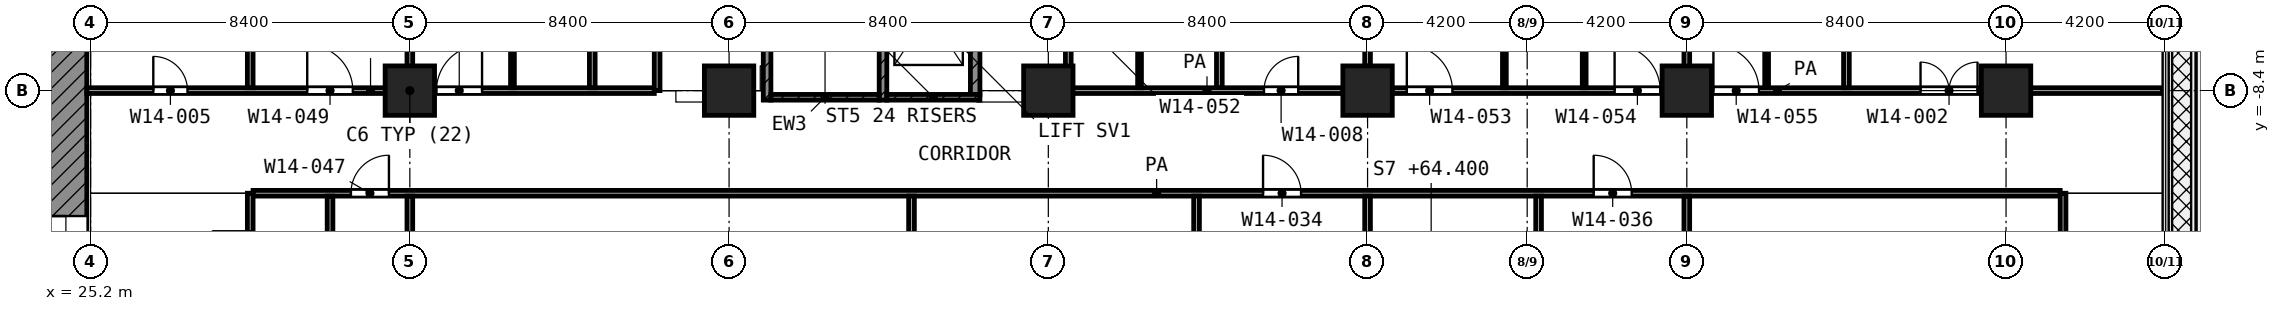
"""IFC4 building model, lengths in metres.
Left out: names, types, materials, properties, quantities, classifications, styles, units other than length and angle.
Written with IfcOpenShell. Run it as: python <this file> out.ifc"""

import sys

from ifc_helpers import new_model, si_unit, direction, frame, frame_2d, origin, origin_2d, place, context, subcontext, project, spatial, rectangle, extrude, element, fill, save


model = new_model("IFC4")
c1 = context("Model", 3, precision=1e-05, world=origin(), true_north=direction((0.0, 1.0)))
c2 = subcontext(c1, "Body", "Model", "MODEL_VIEW")
j1 = project(units=[si_unit("LENGTHUNIT", "METRE"), si_unit("PLANEANGLEUNIT", "RADIAN")], contexts=[c1])
p1 = place(None, origin())
s1 = spatial("IfcSite", under=j1, at=p1, CompositionType="ELEMENT")
p2 = place(p1, origin())
s2 = spatial("IfcBuilding", under=s1, at=p2, CompositionType="ELEMENT")
p3 = place(p2, frame((0.0, 0.0, 64.4)))
s3 = spatial("IfcBuildingStorey", under=s2, at=p3, CompositionType="ELEMENT", Elevation=64.4)
for number, where, z_axis, x_axis in (
    (1, (33.6, -8.4, 0.0), (0.0, 0.0, 1.0), (1.0, 0.0, 0.0)),
    (2, (42.0, -8.4, 0.0), (0.0, 0.0, 1.0), (1.0, 0.0, 0.0)),
    (3, (50.4, -8.4, 0.0), (0.0, 0.0, 1.0), (1.0, 0.0, 0.0)),
    (4, (58.8, -8.4, 0.0), (0.0, 0.0, 1.0), (1.0, 0.0, 0.0)),
    (5, (67.2, -8.4, 0.0), (0.0, 0.0, 1.0), (1.0, 0.0, 0.0)),
    (6, (75.6, -8.4, 0.0), (0.0, 0.0, 1.0), (1.0, 0.0, 0.0)),
):
    element("IfcColumn", number, at=place(p3, frame(where, z_axis=z_axis, x_axis=x_axis)), inside=s3, PredefinedType="COLUMN", context=c2, shape_type="SweptSolid", body=[
        extrude(rectangle(XDim=1.3, YDim=1.3, at=origin_2d()), origin(), (0.0, 0.0, 1.0), 4.2),
    ])
p4 = place(p3, frame((24.55, -24.0, 0.0), z_axis=(0.0, 0.0, 1.0), x_axis=(0.0, 1.0, 0.0)))
e7 = element("IfcWall", 7, at=p4, inside=s3, PredefinedType="SHEAR", context=c2, shape_type="SweptSolid", body=[
    extrude(rectangle(XDim=18.6, YDim=1.1, at=frame_2d((9.3, 0.0))), origin(), (0.0, 0.0, 1.0), 3.9),
])
p5 = place(p4, frame((10.5, 0.0, 0.0)))
e8 = element("IfcOpeningElement", 8, at=p5, cuts=e7, PredefinedType="OPENING", context=c2, shape_type="SweptSolid", body=[
    extrude(rectangle(XDim=1.8, YDim=2.1, at=frame_2d((0.9, 1.05))), frame((0.0, 0.56, 0.0), z_axis=(0.0, -1.0, 0.0), x_axis=(1.0, 0.0, 0.0)), (0.0, 0.0, 1.0), 1.12),
])
p6 = place(p3, frame((43.0, -8.65, 0.0), z_axis=(0.0, 0.0, 1.0), x_axis=(0.0, 1.0, 0.0)))
e9 = element("IfcWall", 9, at=p6, inside=s3, PredefinedType="SHEAR", context=c2, shape_type="SweptSolid", body=[
    extrude(rectangle(XDim=8.35, YDim=0.2, at=frame_2d((4.175, 0.0))), origin(), (0.0, 0.0, 1.0), 3.9),
])
p7 = place(p6, frame((7.0, 0.0, 0.0)))
e10 = element("IfcOpeningElement", 10, at=p7, cuts=e9, PredefinedType="OPENING", context=c2, shape_type="SweptSolid", body=[
    extrude(rectangle(XDim=1.1, YDim=2.1, at=frame_2d((0.55, 1.05))), frame((0.0, 0.11, 0.0), z_axis=(0.0, -1.0, 0.0), x_axis=(1.0, 0.0, 0.0)), (0.0, 0.0, 1.0), 0.22),
])
p8 = place(p3, frame((46.05, -8.65, 0.0), z_axis=(0.0, 0.0, 1.0), x_axis=(0.0, 1.0, 0.0)))
e11 = element("IfcWall", 11, at=p8, inside=s3, PredefinedType="SHEAR", context=c2, shape_type="SweptSolid", body=[
    extrude(rectangle(XDim=8.35, YDim=0.2, at=frame_2d((4.175, 0.0))), origin(), (0.0, 0.0, 1.0), 3.9),
])
p9 = place(p8, frame((7.0, 0.0, 0.0)))
e12 = element("IfcOpeningElement", 12, at=p9, cuts=e11, PredefinedType="OPENING", context=c2, shape_type="SweptSolid", body=[
    extrude(rectangle(XDim=1.1, YDim=2.1, at=frame_2d((0.55, 1.05))), frame((0.0, 0.11, 0.0), z_axis=(0.0, -1.0, 0.0), x_axis=(1.0, 0.0, 0.0)), (0.0, 0.0, 1.0), 0.22),
])
p10 = place(p3, frame((43.1, -8.575, 0.0), z_axis=(0.0, 0.0, 1.0), x_axis=(1.0, 0.0, 0.0)))
e13 = element("IfcWall", 13, at=p10, inside=s3, PredefinedType="SHEAR", context=c2, shape_type="SweptSolid", body=[
    extrude(rectangle(XDim=2.85, YDim=0.15, at=frame_2d((1.425, 0.0))), origin(), (0.0, 0.0, 1.0), 3.9),
])
p11 = place(p3, frame((46.15, -8.575, 0.0), z_axis=(0.0, 0.0, 1.0), x_axis=(1.0, 0.0, 0.0)))
e14 = element("IfcWall", 14, at=p11, inside=s3, PredefinedType="SHEAR", context=c2, shape_type="SweptSolid", body=[
    extrude(rectangle(XDim=2.45, YDim=0.15, at=frame_2d((1.225, 0.0))), origin(), (0.0, 0.0, 1.0), 3.9),
])
p12 = place(p3, frame((48.475, -8.5, 0.0), z_axis=(0.0, 0.0, 1.0), x_axis=(0.0, 1.0, 0.0)))
e15 = element("IfcWall", 15, at=p12, inside=s3, PredefinedType="SHEAR", context=c2, shape_type="SweptSolid", body=[
    extrude(rectangle(XDim=3.475, YDim=0.25, at=frame_2d((1.738, 0.0))), origin(), (0.0, 0.0, 1.0), 3.9),
])
for number, where, z_axis, x_axis in (
    (16, (36.3, -8.325, 0.0), (0.0, 0.0, 1.0), (0.0, 1.0, 0.0)),
    (17, (52.8, -8.325, 0.0), (0.0, 0.0, 1.0), (0.0, 1.0, 0.0)),
):
    element("IfcWall", number, at=place(p3, frame(where, z_axis=z_axis, x_axis=x_axis)), inside=s3, PredefinedType="PARTITIONING", context=c2, shape_type="SweptSolid", body=[
        extrude(rectangle(XDim=3.225, YDim=0.1, at=frame_2d((1.612, 0.0))), origin(), (0.0, 0.0, 1.0), 3.9),
    ])
p13 = place(p3, frame((62.4, -8.325, 0.0), z_axis=(0.0, 0.0, 1.0), x_axis=(0.0, 1.0, 0.0)))
e18 = element("IfcWall", 18, at=p13, inside=s3, PredefinedType="PARTITIONING", context=c2, shape_type="SweptSolid", body=[
    extrude(rectangle(XDim=3.224, YDim=0.1, at=frame_2d((1.612, 0.0))), origin(), (0.0, 0.0, 1.0), 3.9),
])
p14 = place(p3, frame((64.5, -8.325, 0.0), z_axis=(0.0, 0.0, 1.0), x_axis=(0.0, 1.0, 0.0)))
e19 = element("IfcWall", 19, at=p14, inside=s3, PredefinedType="PARTITIONING", context=c2, shape_type="SweptSolid", body=[
    extrude(rectangle(XDim=3.223, YDim=0.1, at=frame_2d((1.611, 0.0))), origin(), (0.0, 0.0, 1.0), 3.9),
])
p15 = place(p3, frame((69.3, -8.325, 0.0), z_axis=(0.0, 0.0, 1.0), x_axis=(0.0, 1.0, 0.0)))
e20 = element("IfcWall", 20, at=p15, inside=s3, PredefinedType="PARTITIONING", context=c2, shape_type="SweptSolid", body=[
    extrude(rectangle(XDim=2.625, YDim=0.1, at=frame_2d((1.312, 0.0))), origin(), (0.0, 0.0, 1.0), 3.9),
])
p16 = place(p3, frame((29.475, -11.1, 0.0), z_axis=(0.0, 0.0, 1.0), x_axis=(1.0, 0.0, 0.0)))
e21 = element("IfcWall", 21, at=p16, inside=s3, PredefinedType="PARTITIONING", context=c2, shape_type="SweptSolid", body=[
    extrude(rectangle(XDim=47.55, YDim=0.15, at=frame_2d((23.775, 0.0))), origin(), (0.0, 0.0, 1.0), 3.9),
])
p17 = place(p16, frame((26.575, 0.0, 0.0)))
e22 = element("IfcOpeningElement", 22, at=p17, cuts=e21, PredefinedType="OPENING", context=c2, shape_type="SweptSolid", body=[
    extrude(rectangle(XDim=1.0, YDim=2.1, at=frame_2d((0.5, 1.05))), frame((0.0, 0.085, 0.0), z_axis=(0.0, -1.0, 0.0), x_axis=(1.0, 0.0, 0.0)), (0.0, 0.0, 1.0), 0.17),
])
p18 = place(p16, frame((35.275, 0.0, 0.0)))
e23 = element("IfcOpeningElement", 23, at=p18, cuts=e21, PredefinedType="OPENING", context=c2, shape_type="SweptSolid", body=[
    extrude(rectangle(XDim=1.0, YDim=2.1, at=frame_2d((0.5, 1.05))), frame((0.0, 0.085, 0.0), z_axis=(0.0, -1.0, 0.0), x_axis=(1.0, 0.0, 0.0)), (0.0, 0.0, 1.0), 0.17),
])
p19 = place(p16, frame((2.575, 0.0, 0.0)))
e24 = element("IfcOpeningElement", 24, at=p19, cuts=e21, PredefinedType="OPENING", context=c2, shape_type="SweptSolid", body=[
    extrude(rectangle(XDim=1.0, YDim=2.1, at=frame_2d((0.5, 1.05))), frame((0.0, 0.085, 0.0), z_axis=(0.0, -1.0, 0.0), x_axis=(1.0, 0.0, 0.0)), (0.0, 0.0, 1.0), 0.17),
])
p20 = place(p3, frame((25.1, -8.4, 0.0), z_axis=(0.0, 0.0, 1.0), x_axis=(1.0, 0.0, 0.0)))
e25 = element("IfcWall", 25, at=p20, inside=s3, PredefinedType="PARTITIONING", context=c2, shape_type="SweptSolid", body=[
    extrude(rectangle(XDim=14.932, YDim=0.15, at=frame_2d((7.466, 0.0))), origin(), (0.0, 0.0, 1.0), 3.9),
])
p21 = place(p20, frame((1.75, 0.0, 0.0)))
e26 = element("IfcOpeningElement", 26, at=p21, cuts=e25, PredefinedType="OPENING", context=c2, shape_type="SweptSolid", body=[
    extrude(rectangle(XDim=0.9, YDim=2.1, at=frame_2d((0.45, 1.05))), frame((0.0, 0.085, 0.0), z_axis=(0.0, -1.0, 0.0), x_axis=(1.0, 0.0, 0.0)), (0.0, 0.0, 1.0), 0.17),
])
p22 = place(p20, frame((5.8, 0.0, 0.0)))
e27 = element("IfcOpeningElement", 27, at=p22, cuts=e25, PredefinedType="OPENING", context=c2, shape_type="SweptSolid", body=[
    extrude(rectangle(XDim=1.2, YDim=2.1, at=frame_2d((0.6, 1.05))), frame((0.0, 0.085, 0.0), z_axis=(0.0, -1.0, 0.0), x_axis=(1.0, 0.0, 0.0)), (0.0, 0.0, 1.0), 0.17),
])
p23 = place(p20, frame((9.2, 0.0, 0.0)))
e28 = element("IfcOpeningElement", 28, at=p23, cuts=e25, PredefinedType="OPENING", context=c2, shape_type="SweptSolid", body=[
    extrude(rectangle(XDim=1.2, YDim=2.1, at=frame_2d((0.6, 1.05))), frame((0.0, 0.085, 0.0), z_axis=(0.0, -1.0, 0.0), x_axis=(1.0, 0.0, 0.0)), (0.0, 0.0, 1.0), 0.17),
])
p24 = place(p3, frame((51.0, -8.4, 0.0), z_axis=(0.0, 0.0, 1.0), x_axis=(1.0, 0.0, 0.0)))
e29 = element("IfcWall", 29, at=p24, inside=s3, PredefinedType="PARTITIONING", context=c2, shape_type="SweptSolid", body=[
    extrude(rectangle(XDim=7.15, YDim=0.15, at=frame_2d((3.575, 0.0))), origin(), (0.0, 0.0, 1.0), 3.9),
])
p25 = place(p24, frame((5.075, 0.0, 0.0)))
e30 = element("IfcOpeningElement", 30, at=p25, cuts=e29, PredefinedType="OPENING", context=c2, shape_type="SweptSolid", body=[
    extrude(rectangle(XDim=0.9, YDim=2.1, at=frame_2d((0.45, 1.05))), frame((0.0, 0.085, 0.0), z_axis=(0.0, -1.0, 0.0), x_axis=(1.0, 0.0, 0.0)), (0.0, 0.0, 1.0), 0.17),
])
p26 = place(p3, frame((59.45, -8.4, 0.0), z_axis=(0.0, 0.0, 1.0), x_axis=(1.0, 0.0, 0.0)))
e31 = element("IfcWall", 31, at=p26, inside=s3, PredefinedType="PARTITIONING", context=c2, shape_type="SweptSolid", body=[
    extrude(rectangle(XDim=20.27, YDim=0.15, at=frame_2d((10.135, 0.0))), origin(), (0.0, 0.0, 1.0), 3.9),
])
p27 = place(p26, frame((0.383, 0.0, 0.0)))
e32 = element("IfcOpeningElement", 32, at=p27, cuts=e31, PredefinedType="OPENING", context=c2, shape_type="SweptSolid", body=[
    extrude(rectangle(XDim=1.2, YDim=2.1, at=frame_2d((0.6, 1.05))), frame((0.0, 0.085, 0.0), z_axis=(0.0, -1.0, 0.0), x_axis=(1.0, 0.0, 0.0)), (0.0, 0.0, 1.0), 0.17),
])
p28 = place(p26, frame((5.85, 0.0, 0.0)))
e33 = element("IfcOpeningElement", 33, at=p28, cuts=e31, PredefinedType="OPENING", context=c2, shape_type="SweptSolid", body=[
    extrude(rectangle(XDim=1.2, YDim=2.1, at=frame_2d((0.6, 1.05))), frame((0.0, 0.085, 0.0), z_axis=(0.0, -1.0, 0.0), x_axis=(1.0, 0.0, 0.0)), (0.0, 0.0, 1.0), 0.17),
])
p29 = place(p26, frame((8.45, 0.0, 0.0)))
e34 = element("IfcOpeningElement", 34, at=p29, cuts=e31, PredefinedType="OPENING", context=c2, shape_type="SweptSolid", body=[
    extrude(rectangle(XDim=1.2, YDim=2.1, at=frame_2d((0.6, 1.05))), frame((0.0, 0.085, 0.0), z_axis=(0.0, -1.0, 0.0), x_axis=(1.0, 0.0, 0.0)), (0.0, 0.0, 1.0), 0.17),
])
p30 = place(p26, frame((13.9, 0.0, 0.0)))
e35 = element("IfcOpeningElement", 35, at=p30, cuts=e31, PredefinedType="OPENING", context=c2, shape_type="SweptSolid", body=[
    extrude(rectangle(XDim=1.5, YDim=2.1, at=frame_2d((0.75, 1.05))), frame((0.0, 0.085, 0.0), z_axis=(0.0, -1.0, 0.0), x_axis=(1.0, 0.0, 0.0)), (0.0, 0.0, 1.0), 0.17),
])
p31 = place(p3, frame((29.4, -14.1, 0.0), z_axis=(0.0, 0.0, 1.0), x_axis=(0.0, 1.0, 0.0)))
e36 = element("IfcWall", 36, at=p31, inside=s3, PredefinedType="PARTITIONING", context=c2, shape_type="SweptSolid", body=[
    extrude(rectangle(XDim=3.0, YDim=0.15, at=frame_2d((1.5, 0.0))), origin(), (0.0, 0.0, 1.0), 3.9),
])
p32 = place(p31, frame((1.0, 0.0, 0.0)))
e37 = element("IfcOpeningElement", 37, at=p32, cuts=e36, PredefinedType="OPENING", context=c2, shape_type="SweptSolid", body=[
    extrude(rectangle(XDim=1.0, YDim=2.1, at=frame_2d((0.5, 1.05))), frame((0.0, 0.085, 0.0), z_axis=(0.0, -1.0, 0.0), x_axis=(1.0, 0.0, 0.0)), (0.0, 0.0, 1.0), 0.17),
])
p33 = place(p3, frame((29.4, -8.325, 0.0), z_axis=(0.0, 0.0, 1.0), x_axis=(0.0, 1.0, 0.0)))
e38 = element("IfcWall", 38, at=p33, inside=s3, PredefinedType="PARTITIONING", context=c2, shape_type="SweptSolid", body=[
    extrude(rectangle(XDim=8.245, YDim=0.15, at=frame_2d((4.123, 0.0))), origin(), (0.0, 0.0, 1.0), 3.9),
])
for number, where, z_axis, x_axis in (
    (39, (31.5, -14.025, 0.0), (0.0, 0.0, 1.0), (0.0, 1.0, 0.0)),
    (40, (33.6, -14.025, 0.0), (0.0, 0.0, 1.0), (0.0, 1.0, 0.0)),
):
    element("IfcWall", number, at=place(p3, frame(where, z_axis=z_axis, x_axis=x_axis)), inside=s3, PredefinedType="PARTITIONING", context=c2, shape_type="SweptSolid", body=[
        extrude(rectangle(XDim=2.85, YDim=0.15, at=frame_2d((1.425, 0.0))), origin(), (0.0, 0.0, 1.0), 3.9),
    ])
for number, where, z_axis, x_axis in (
    (41, (33.6, -8.325, 0.0), (0.0, 0.0, 1.0), (0.0, 1.0, 0.0)),
    (42, (38.4, -8.325, 0.0), (0.0, 0.0, 1.0), (0.0, 1.0, 0.0)),
):
    element("IfcWall", number, at=place(p3, frame(where, z_axis=z_axis, x_axis=x_axis)), inside=s3, PredefinedType="PARTITIONING", context=c2, shape_type="SweptSolid", body=[
        extrude(rectangle(XDim=8.245, YDim=0.15, at=frame_2d((4.123, 0.0))), origin(), (0.0, 0.0, 1.0), 3.9),
    ])
p34 = place(p3, frame((40.107, -8.4, 0.0), z_axis=(0.0, 0.0, 1.0), x_axis=(0.0, 1.0, 0.0)))
e43 = element("IfcWall", 43, at=p34, inside=s3, PredefinedType="PARTITIONING", context=c2, shape_type="SweptSolid", body=[
    extrude(rectangle(XDim=8.048, YDim=0.15, at=frame_2d((4.024, 0.0))), origin(), (0.0, 0.0, 1.0), 3.9),
])
p35 = place(p34, frame((3.524, 0.0, 0.0)))
e44 = element("IfcOpeningElement", 44, at=p35, cuts=e43, PredefinedType="OPENING", context=c2, shape_type="SweptSolid", body=[
    extrude(rectangle(XDim=1.0, YDim=2.1, at=frame_2d((0.5, 1.05))), frame((0.0, 0.085, 0.0), z_axis=(0.0, -1.0, 0.0), x_axis=(1.0, 0.0, 0.0)), (0.0, 0.0, 1.0), 0.17),
])
p36 = place(p3, frame((46.8, -14.025, 0.0), z_axis=(0.0, 0.0, 1.0), x_axis=(0.0, 1.0, 0.0)))
e45 = element("IfcWall", 45, at=p36, inside=s3, PredefinedType="PARTITIONING", context=c2, shape_type="SweptSolid", body=[
    extrude(rectangle(XDim=2.85, YDim=0.15, at=frame_2d((1.425, 0.0))), origin(), (0.0, 0.0, 1.0), 3.9),
])
p37 = place(p3, frame((50.925, -8.4, 0.0), z_axis=(0.0, 0.0, 1.0), x_axis=(0.0, 1.0, 0.0)))
e46 = element("IfcWall", 46, at=p37, inside=s3, PredefinedType="PARTITIONING", context=c2, shape_type="SweptSolid", body=[
    extrude(rectangle(XDim=6.55, YDim=0.15, at=frame_2d((3.275, 0.0))), origin(), (0.0, 0.0, 1.0), 3.9),
])
p38 = place(p37, frame((3.767, 0.0, 0.0)))
e47 = element("IfcOpeningElement", 47, at=p38, cuts=e46, PredefinedType="OPENING", context=c2, shape_type="SweptSolid", body=[
    extrude(rectangle(XDim=1.2, YDim=2.1, at=frame_2d((0.6, 1.05))), frame((0.0, 0.085, 0.0), z_axis=(0.0, -1.0, 0.0), x_axis=(1.0, 0.0, 0.0)), (0.0, 0.0, 1.0), 0.17),
])
p39 = place(p37, frame((1.583, 0.0, 0.0)))
e48 = element("IfcOpeningElement", 48, at=p39, cuts=e46, PredefinedType="OPENING", context=c2, shape_type="SweptSolid", body=[
    extrude(rectangle(XDim=1.2, YDim=2.1, at=frame_2d((0.6, 1.05))), frame((0.0, 0.085, 0.0), z_axis=(0.0, -1.0, 0.0), x_axis=(1.0, 0.0, 0.0)), (0.0, 0.0, 1.0), 0.17),
])
p40 = place(p3, frame((54.3, -14.025, 0.0), z_axis=(0.0, 0.0, 1.0), x_axis=(0.0, 1.0, 0.0)))
e49 = element("IfcWall", 49, at=p40, inside=s3, PredefinedType="PARTITIONING", context=c2, shape_type="SweptSolid", body=[
    extrude(rectangle(XDim=2.85, YDim=0.15, at=frame_2d((1.425, 0.0))), origin(), (0.0, 0.0, 1.0), 3.9),
])
p41 = place(p3, frame((54.9, -8.325, 0.0), z_axis=(0.0, 0.0, 1.0), x_axis=(0.0, 1.0, 0.0)))
e50 = element("IfcWall", 50, at=p41, inside=s3, PredefinedType="PARTITIONING", context=c2, shape_type="SweptSolid", body=[
    extrude(rectangle(XDim=8.245, YDim=0.15, at=frame_2d((4.123, 0.0))), origin(), (0.0, 0.0, 1.0), 3.9),
])
p42 = place(p3, frame((58.8, -14.025, 0.0), z_axis=(0.0, 0.0, 1.0), x_axis=(0.0, 1.0, 0.0)))
e51 = element("IfcWall", 51, at=p42, inside=s3, PredefinedType="PARTITIONING", context=c2, shape_type="SweptSolid", body=[
    extrude(rectangle(XDim=2.85, YDim=0.15, at=frame_2d((1.425, 0.0))), origin(), (0.0, 0.0, 1.0), 3.9),
])
p43 = place(p3, frame((58.8, -7.75, 0.0), z_axis=(0.0, 0.0, 1.0), x_axis=(0.0, 1.0, 0.0)))
e52 = element("IfcWall", 52, at=p43, inside=s3, PredefinedType="PARTITIONING", context=c2, shape_type="SweptSolid", body=[
    extrude(rectangle(XDim=7.15, YDim=0.15, at=frame_2d((3.575, 0.0))), origin(), (0.0, 0.0, 1.0), 3.9),
])
for number, where, z_axis, x_axis in (
    (53, (63.3, -14.025, 0.0), (0.0, 0.0, 1.0), (0.0, 1.0, 0.0)),
    (54, (67.2, -14.025, 0.0), (0.0, 0.0, 1.0), (0.0, 1.0, 0.0)),
):
    element("IfcWall", number, at=place(p3, frame(where, z_axis=z_axis, x_axis=x_axis)), inside=s3, PredefinedType="PARTITIONING", context=c2, shape_type="SweptSolid", body=[
        extrude(rectangle(XDim=2.85, YDim=0.15, at=frame_2d((1.425, 0.0))), origin(), (0.0, 0.0, 1.0), 3.9),
    ])
for number, where, z_axis, x_axis in (
    (55, (67.2, -8.325, 0.0), (0.0, 0.0, 1.0), (0.0, 1.0, 0.0)),
    (56, (71.4, -8.325, 0.0), (0.0, 0.0, 1.0), (0.0, 1.0, 0.0)),
):
    element("IfcWall", number, at=place(p3, frame(where, z_axis=z_axis, x_axis=x_axis)), inside=s3, PredefinedType="PARTITIONING", context=c2, shape_type="SweptSolid", body=[
        extrude(rectangle(XDim=8.245, YDim=0.15, at=frame_2d((4.123, 0.0))), origin(), (0.0, 0.0, 1.0), 3.9),
    ])
p44 = place(p3, frame((77.1, -14.1, 0.0), z_axis=(0.0, 0.0, 1.0), x_axis=(0.0, 1.0, 0.0)))
e57 = element("IfcWall", 57, at=p44, inside=s3, PredefinedType="PARTITIONING", context=c2, shape_type="SweptSolid", body=[
    extrude(rectangle(XDim=3.0, YDim=0.15, at=frame_2d((1.5, 0.0))), origin(), (0.0, 0.0, 1.0), 3.9),
])
p45 = place(p5, origin())
e58 = element("IfcDoor", 58, at=p45, inside=s3, OperationType="DOUBLE_DOOR_SINGLE_SWING", PredefinedType="DOOR", context=c2, shape_type="SweptSolid", body=[
    extrude(rectangle(XDim=1.8, YDim=2.1, at=frame_2d((0.9, 1.05))), frame((0.0, 0.025, 0.0), z_axis=(0.0, -1.0, 0.0), x_axis=(1.0, 0.0, 0.0)), (0.0, 0.0, 1.0), 0.05),
])
fill(e8, e58)
p46 = place(p21, origin())
e59 = element("IfcDoor", 59, at=p46, inside=s3, OperationType="SINGLE_SWING_LEFT", PredefinedType="DOOR", context=c2, shape_type="SweptSolid", body=[
    extrude(rectangle(XDim=0.9, YDim=2.1, at=frame_2d((0.45, 1.05))), frame((0.0, 0.025, 0.0), z_axis=(0.0, -1.0, 0.0), x_axis=(1.0, 0.0, 0.0)), (0.0, 0.0, 1.0), 0.05),
])
fill(e26, e59)
p47 = place(p22, origin())
e60 = element("IfcDoor", 60, at=p47, inside=s3, OperationType="SINGLE_SWING_LEFT", PredefinedType="DOOR", context=c2, shape_type="SweptSolid", body=[
    extrude(rectangle(XDim=1.2, YDim=2.1, at=frame_2d((0.6, 1.05))), frame((0.0, 0.025, 0.0), z_axis=(0.0, -1.0, 0.0), x_axis=(1.0, 0.0, 0.0)), (0.0, 0.0, 1.0), 0.05),
])
fill(e27, e60)
p48 = place(p23, origin())
e61 = element("IfcDoor", 61, at=p48, inside=s3, OperationType="SINGLE_SWING_RIGHT", PredefinedType="DOOR", context=c2, shape_type="SweptSolid", body=[
    extrude(rectangle(XDim=1.2, YDim=2.1, at=frame_2d((0.6, 1.05))), frame((0.0, 0.025, 0.0), z_axis=(0.0, -1.0, 0.0), x_axis=(1.0, 0.0, 0.0)), (0.0, 0.0, 1.0), 0.05),
])
fill(e28, e61)
p49 = place(p25, origin())
e62 = element("IfcDoor", 62, at=p49, inside=s3, OperationType="SINGLE_SWING_RIGHT", PredefinedType="DOOR", context=c2, shape_type="SweptSolid", body=[
    extrude(rectangle(XDim=0.9, YDim=2.1, at=frame_2d((0.45, 1.05))), frame((0.0, 0.025, 0.0), z_axis=(0.0, -1.0, 0.0), x_axis=(1.0, 0.0, 0.0)), (0.0, 0.0, 1.0), 0.05),
])
fill(e30, e62)
p50 = place(p27, origin())
e63 = element("IfcDoor", 63, at=p50, inside=s3, OperationType="SINGLE_SWING_LEFT", PredefinedType="DOOR", context=c2, shape_type="SweptSolid", body=[
    extrude(rectangle(XDim=1.2, YDim=2.1, at=frame_2d((0.6, 1.05))), frame((0.0, 0.025, 0.0), z_axis=(0.0, -1.0, 0.0), x_axis=(1.0, 0.0, 0.0)), (0.0, 0.0, 1.0), 0.05),
])
fill(e32, e63)
p51 = place(p28, origin())
e64 = element("IfcDoor", 64, at=p51, inside=s3, OperationType="SINGLE_SWING_LEFT", PredefinedType="DOOR", context=c2, shape_type="SweptSolid", body=[
    extrude(rectangle(XDim=1.2, YDim=2.1, at=frame_2d((0.6, 1.05))), frame((0.0, 0.025, 0.0), z_axis=(0.0, -1.0, 0.0), x_axis=(1.0, 0.0, 0.0)), (0.0, 0.0, 1.0), 0.05),
])
fill(e33, e64)
p52 = place(p29, origin())
e65 = element("IfcDoor", 65, at=p52, inside=s3, OperationType="SINGLE_SWING_LEFT", PredefinedType="DOOR", context=c2, shape_type="SweptSolid", body=[
    extrude(rectangle(XDim=1.2, YDim=2.1, at=frame_2d((0.6, 1.05))), frame((0.0, 0.025, 0.0), z_axis=(0.0, -1.0, 0.0), x_axis=(1.0, 0.0, 0.0)), (0.0, 0.0, 1.0), 0.05),
])
fill(e34, e65)
p53 = place(p30, origin())
e66 = element("IfcDoor", 66, at=p53, inside=s3, OperationType="DOUBLE_DOOR_SINGLE_SWING", PredefinedType="DOOR", context=c2, shape_type="SweptSolid", body=[
    extrude(rectangle(XDim=1.5, YDim=2.1, at=frame_2d((0.75, 1.05))), frame((0.0, 0.025, 0.0), z_axis=(0.0, -1.0, 0.0), x_axis=(1.0, 0.0, 0.0)), (0.0, 0.0, 1.0), 0.05),
])
fill(e35, e66)
p54 = place(p17, origin())
e67 = element("IfcDoor", 67, at=p54, inside=s3, OperationType="SINGLE_SWING_LEFT", PredefinedType="DOOR", context=c2, shape_type="SweptSolid", body=[
    extrude(rectangle(XDim=1.0, YDim=2.1, at=frame_2d((0.5, 1.05))), frame((0.0, 0.025, 0.0), z_axis=(0.0, -1.0, 0.0), x_axis=(1.0, 0.0, 0.0)), (0.0, 0.0, 1.0), 0.05),
])
fill(e22, e67)
p55 = place(p18, origin())
e68 = element("IfcDoor", 68, at=p55, inside=s3, OperationType="SINGLE_SWING_LEFT", PredefinedType="DOOR", context=c2, shape_type="SweptSolid", body=[
    extrude(rectangle(XDim=1.0, YDim=2.1, at=frame_2d((0.5, 1.05))), frame((0.0, 0.025, 0.0), z_axis=(0.0, -1.0, 0.0), x_axis=(1.0, 0.0, 0.0)), (0.0, 0.0, 1.0), 0.05),
])
fill(e23, e68)
p56 = place(p19, origin())
e69 = element("IfcDoor", 69, at=p56, inside=s3, OperationType="SINGLE_SWING_RIGHT", PredefinedType="DOOR", context=c2, shape_type="SweptSolid", body=[
    extrude(rectangle(XDim=1.0, YDim=2.1, at=frame_2d((0.5, 1.05))), frame((0.0, 0.025, 0.0), z_axis=(0.0, -1.0, 0.0), x_axis=(1.0, 0.0, 0.0)), (0.0, 0.0, 1.0), 0.05),
])
fill(e24, e69)
save(model, sys.argv[1])
